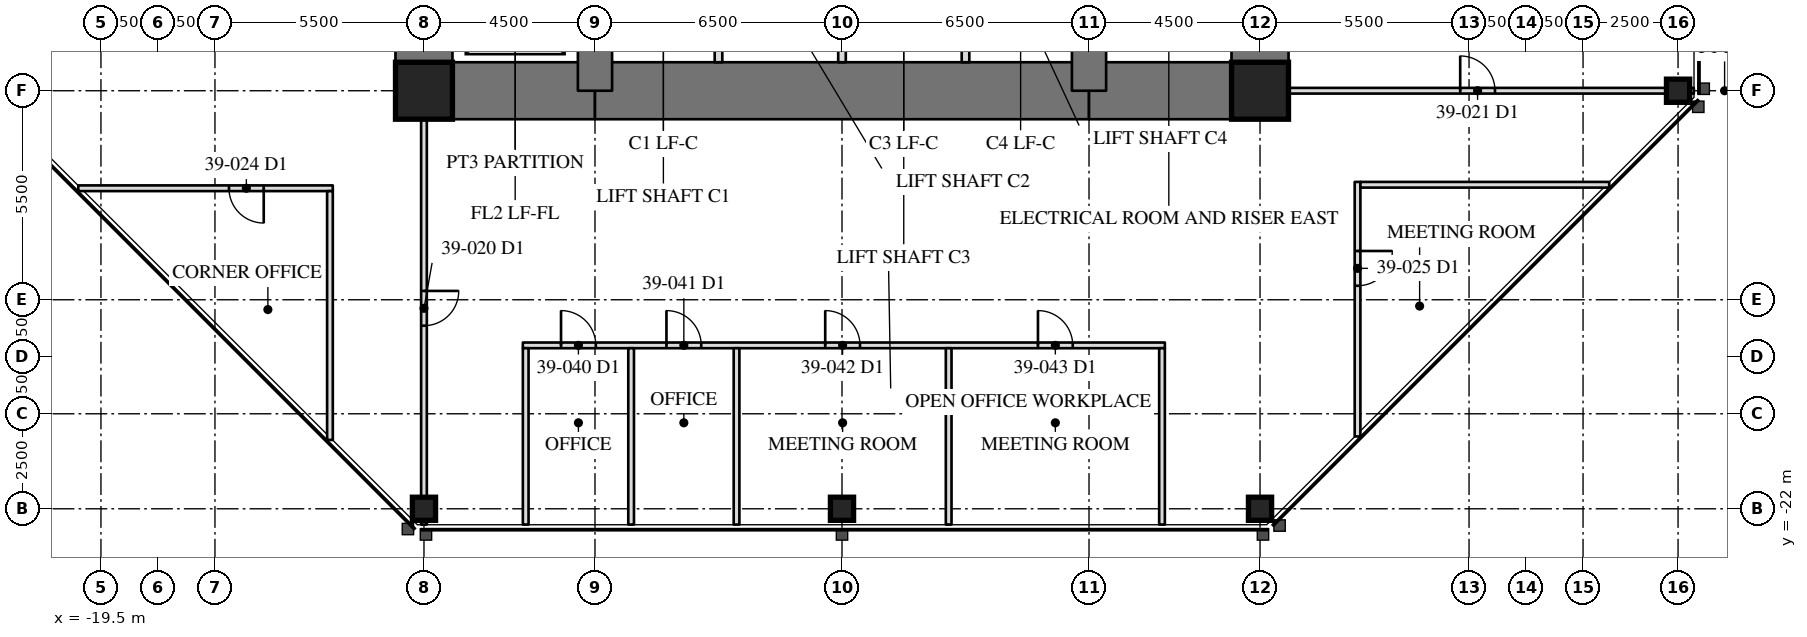
"""IFC4 building model, lengths in metres.
Left out: names, types, materials, properties, quantities, classifications, styles, units other than length and angle.
Written with IfcOpenShell. Run it as: python <this file> out.ifc"""

import sys

from ifc_helpers import new_model, si_unit, direction, frame, frame_2d, origin, origin_2d, place, context, subcontext, project, spatial, rectangle, hollow_rectangle, extrude, element, fill, save


model = new_model("IFC4")
c1 = context("Model", 3, precision=1e-05, world=origin(), true_north=direction((0.0, 1.0)))
c2 = subcontext(c1, "Body", "Model", "MODEL_VIEW")
j1 = project(units=[si_unit("LENGTHUNIT", "METRE"), si_unit("PLANEANGLEUNIT", "RADIAN")], contexts=[c1])
p1 = place(None, origin())
s1 = spatial("IfcSite", under=j1, at=p1, CompositionType="ELEMENT")
p2 = place(p1, origin())
s2 = spatial("IfcBuilding", under=s1, at=p2, CompositionType="ELEMENT")
p3 = place(p2, frame((0.0, 0.0, 166.4)))
s3 = spatial("IfcBuildingStorey", under=s2, at=p3, CompositionType="ELEMENT", Elevation=166.4)
for number, where, z_axis, x_axis in (
    (1, (-11.0, -22.0, 0.0), (0.0, 0.0, 1.0), (1.0, 0.0, 0.0)),
    (2, (0.0, -22.0, 0.0), (0.0, 0.0, 1.0), (1.0, 0.0, 0.0)),
    (3, (11.0, -22.0, 0.0), (0.0, 0.0, 1.0), (1.0, 0.0, 0.0)),
    (4, (22.0, -11.0, 0.0), (0.0, 0.0, 1.0), (0.0, 1.0, 0.0)),
):
    element("IfcColumn", number, at=place(p3, frame(where, z_axis=z_axis, x_axis=x_axis)), inside=s3, PredefinedType="COLUMN", context=c2, shape_type="SweptSolid", body=[
        extrude(hollow_rectangle(XDim=0.61, YDim=0.61, WallThickness=0.076, at=origin_2d()), origin(), (0.0, 0.0, 1.0), 4.1),
    ])
p4 = place(p3, frame((11.0, -11.0, 0.0), z_axis=(0.0, 0.0, 1.0), x_axis=(0.0, 1.0, 0.0)))
e5 = element("IfcWall", 5, at=p4, inside=s3, PredefinedType="SHEAR", context=c2, shape_type="SweptSolid", body=[
    extrude(rectangle(XDim=22.0, YDim=1.5, at=frame_2d((11.0, 0.0))), origin(), (0.0, 0.0, 1.0), 4.1),
])
p5 = place(p4, frame((15.393, 0.0, 0.0)))
e6 = element("IfcOpeningElement", 6, at=p5, cuts=e5, PredefinedType="OPENING", context=c2, shape_type="SweptSolid", body=[
    extrude(rectangle(XDim=0.915, YDim=2.134, at=frame_2d((0.458, 1.067))), frame((0.0, 0.76, 0.0), z_axis=(0.0, -1.0, 0.0), x_axis=(1.0, 0.0, 0.0)), (0.0, 0.0, 1.0), 1.52),
])
p6 = place(p3, frame((-11.0, 11.0, 0.0), z_axis=(0.0, 0.0, 1.0), x_axis=(0.0, -1.0, 0.0)))
e7 = element("IfcWall", 7, at=p6, inside=s3, PredefinedType="SHEAR", context=c2, shape_type="SweptSolid", body=[
    extrude(rectangle(XDim=22.0, YDim=1.5, at=frame_2d((11.0, 0.0))), origin(), (0.0, 0.0, 1.0), 4.1),
])
p7 = place(p6, frame((15.393, 0.0, 0.0)))
e8 = element("IfcOpeningElement", 8, at=p7, cuts=e7, PredefinedType="OPENING", context=c2, shape_type="SweptSolid", body=[
    extrude(rectangle(XDim=0.915, YDim=2.134, at=frame_2d((0.458, 1.067))), frame((0.0, 0.76, 0.0), z_axis=(0.0, -1.0, 0.0), x_axis=(1.0, 0.0, 0.0)), (0.0, 0.0, 1.0), 1.52),
])
p8 = place(p3, frame((-11.0, -11.0, 0.0), z_axis=(0.0, 0.0, 1.0), x_axis=(1.0, 0.0, 0.0)))
e9 = element("IfcWall", 9, at=p8, inside=s3, PredefinedType="SHEAR", context=c2, shape_type="SweptSolid", body=[
    extrude(rectangle(XDim=4.5, YDim=1.5, at=frame_2d((2.25, 0.0))), origin(), (0.0, 0.0, 1.0), 4.1),
])
p9 = place(p3, frame((-6.5, -11.0, 0.0), z_axis=(0.0, 0.0, 1.0), x_axis=(1.0, 0.0, 0.0)))
e10 = element("IfcWall", 10, at=p9, inside=s3, PredefinedType="SHEAR", context=c2, shape_type="SweptSolid", body=[
    extrude(rectangle(XDim=13.0, YDim=1.5, at=frame_2d((6.5, 0.0))), origin(), (0.0, 0.0, 1.0), 4.1),
])
p10 = place(p3, frame((6.5, -11.0, 0.0), z_axis=(0.0, 0.0, 1.0), x_axis=(1.0, 0.0, 0.0)))
e11 = element("IfcWall", 11, at=p10, inside=s3, PredefinedType="SHEAR", context=c2, shape_type="SweptSolid", body=[
    extrude(rectangle(XDim=4.5, YDim=1.5, at=frame_2d((2.25, 0.0))), origin(), (0.0, 0.0, 1.0), 4.1),
])
for number, where, z_axis, x_axis in (
    (12, (6.5, -11.0, 0.0), (0.0, 0.0, 1.0), (0.0, 1.0, 0.0)),
    (13, (-6.5, -6.5, 0.0), (0.0, 0.0, 1.0), (0.0, -1.0, 0.0)),
):
    element("IfcWall", number, at=place(p3, frame(where, z_axis=z_axis, x_axis=x_axis)), inside=s3, PredefinedType="SHEAR", context=c2, shape_type="SweptSolid", body=[
        extrude(rectangle(XDim=4.5, YDim=0.9, at=frame_2d((2.25, 0.0))), origin(), (0.0, 0.0, 1.0), 4.1),
    ])
for number, where, z_axis, x_axis in (
    (14, (-11.0, -11.0, 0.0), (0.0, 0.0, 1.0), (1.0, 0.0, 0.0)),
    (15, (11.0, -11.0, 0.0), (0.0, 0.0, 1.0), (1.0, 0.0, 0.0)),
):
    element("IfcColumn", number, at=place(p3, frame(where, z_axis=z_axis, x_axis=x_axis)), inside=s3, PredefinedType="COLUMN", context=c2, shape_type="SweptSolid", body=[
        extrude(hollow_rectangle(XDim=1.499, YDim=1.499, WallThickness=0.102, at=origin_2d()), origin(), (0.0, 0.0, 1.0), 4.1),
    ])
for number, where, z_axis, x_axis in (
    (16, (-3.25, -10.25, 0.0), (0.0, 0.0, 1.0), (0.0, 1.0, 0.0)),
    (17, (0.0, -10.25, 0.0), (0.0, 0.0, 1.0), (0.0, 1.0, 0.0)),
    (18, (3.25, -10.25, 0.0), (0.0, 0.0, 1.0), (0.0, 1.0, 0.0)),
):
    element("IfcWall", number, at=place(p3, frame(where, z_axis=z_axis, x_axis=x_axis)), inside=s3, PredefinedType="PARTITIONING", context=c2, shape_type="SweptSolid", body=[
        extrude(rectangle(XDim=3.3, YDim=0.2, at=frame_2d((1.65, 0.0))), origin(), (0.0, 0.0, 1.0), 3.91),
    ])
p11 = place(p3, frame((-11.0, -11.75, 0.0), z_axis=(0.0, 0.0, 1.0), x_axis=(0.0, -1.0, 0.0)))
e19 = element("IfcWall", 19, at=p11, inside=s3, PredefinedType="PARTITIONING", context=c2, shape_type="SweptSolid", body=[
    extrude(rectangle(XDim=10.665, YDim=0.15, at=frame_2d((5.333, 0.0))), origin(), (0.0, 0.0, 1.0), 3.326),
])
p12 = place(p11, frame((4.518, 0.0, 0.0)))
e20 = element("IfcOpeningElement", 20, at=p12, cuts=e19, PredefinedType="OPENING", context=c2, shape_type="SweptSolid", body=[
    extrude(rectangle(XDim=0.915, YDim=2.134, at=frame_2d((0.458, 1.067))), frame((0.0, 0.085, 0.0), z_axis=(0.0, -1.0, 0.0), x_axis=(1.0, 0.0, 0.0)), (0.0, 0.0, 1.0), 0.17),
])
p13 = place(p3, frame((11.75, -11.0, 0.0), z_axis=(0.0, 0.0, 1.0), x_axis=(1.0, 0.0, 0.0)))
e21 = element("IfcWall", 21, at=p13, inside=s3, PredefinedType="PARTITIONING", context=c2, shape_type="SweptSolid", body=[
    extrude(rectangle(XDim=10.665, YDim=0.15, at=frame_2d((5.333, 0.0))), origin(), (0.0, 0.0, 1.0), 3.326),
])
p14 = place(p13, frame((4.518, 0.0, 0.0)))
e22 = element("IfcOpeningElement", 22, at=p14, cuts=e21, PredefinedType="OPENING", context=c2, shape_type="SweptSolid", body=[
    extrude(rectangle(XDim=0.915, YDim=2.134, at=frame_2d((0.458, 1.067))), frame((0.0, 0.085, 0.0), z_axis=(0.0, -1.0, 0.0), x_axis=(1.0, 0.0, 0.0)), (0.0, 0.0, 1.0), 0.17),
])
p15 = place(p3, frame((-13.399, -13.566, 0.0), z_axis=(0.0, 0.0, 1.0), x_axis=(-1.0, 0.0, 0.0)))
e23 = element("IfcWall", 23, at=p15, inside=s3, PredefinedType="PARTITIONING", context=c2, shape_type="SweptSolid", body=[
    extrude(rectangle(XDim=6.698, YDim=0.15, at=frame_2d((3.349, 0.0))), origin(), (0.0, 0.0, 1.0), 3.91),
])
p16 = place(p15, frame((1.817, 0.0, 0.0)))
e24 = element("IfcOpeningElement", 24, at=p16, cuts=e23, PredefinedType="OPENING", context=c2, shape_type="SweptSolid", body=[
    extrude(rectangle(XDim=0.915, YDim=2.134, at=frame_2d((0.458, 1.067))), frame((0.0, 0.085, 0.0), z_axis=(0.0, -1.0, 0.0), x_axis=(1.0, 0.0, 0.0)), (0.0, 0.0, 1.0), 0.17),
])
p17 = place(p3, frame((-13.474, -13.641, 0.0), z_axis=(0.0, 0.0, 1.0), x_axis=(0.0, -1.0, 0.0)))
e25 = element("IfcWall", 25, at=p17, inside=s3, PredefinedType="PARTITIONING", context=c2, shape_type="SweptSolid", body=[
    extrude(rectangle(XDim=6.548, YDim=0.15, at=frame_2d((3.274, 0.0))), origin(), (0.0, 0.0, 1.0), 3.91),
])
p18 = place(p3, frame((13.566, -13.399, 0.0), z_axis=(0.0, 0.0, 1.0), x_axis=(0.0, -1.0, 0.0)))
e26 = element("IfcWall", 26, at=p18, inside=s3, PredefinedType="PARTITIONING", context=c2, shape_type="SweptSolid", body=[
    extrude(rectangle(XDim=6.698, YDim=0.15, at=frame_2d((3.349, 0.0))), origin(), (0.0, 0.0, 1.0), 3.91),
])
p19 = place(p18, frame((1.817, 0.0, 0.0)))
e27 = element("IfcOpeningElement", 27, at=p19, cuts=e26, PredefinedType="OPENING", context=c2, shape_type="SweptSolid", body=[
    extrude(rectangle(XDim=0.915, YDim=2.134, at=frame_2d((0.458, 1.067))), frame((0.0, 0.085, 0.0), z_axis=(0.0, -1.0, 0.0), x_axis=(1.0, 0.0, 0.0)), (0.0, 0.0, 1.0), 0.17),
])
p20 = place(p3, frame((13.641, -13.474, 0.0), z_axis=(0.0, 0.0, 1.0), x_axis=(1.0, 0.0, 0.0)))
e28 = element("IfcWall", 28, at=p20, inside=s3, PredefinedType="PARTITIONING", context=c2, shape_type="SweptSolid", body=[
    extrude(rectangle(XDim=6.548, YDim=0.15, at=frame_2d((3.274, 0.0))), origin(), (0.0, 0.0, 1.0), 3.91),
])
p21 = place(p3, frame((-8.398, -17.7, 0.0), z_axis=(0.0, 0.0, 1.0), x_axis=(1.0, 0.0, 0.0)))
e29 = element("IfcWall", 29, at=p21, inside=s3, PredefinedType="PARTITIONING", context=c2, shape_type="SweptSolid", body=[
    extrude(rectangle(XDim=16.894, YDim=0.15, at=frame_2d((8.447, 0.0))), origin(), (0.0, 0.0, 1.0), 3.91),
])
p22 = place(p21, frame((1.004, 0.0, 0.0)))
e30 = element("IfcOpeningElement", 30, at=p22, cuts=e29, PredefinedType="OPENING", context=c2, shape_type="SweptSolid", body=[
    extrude(rectangle(XDim=0.915, YDim=2.134, at=frame_2d((0.458, 1.067))), frame((0.0, 0.085, 0.0), z_axis=(0.0, -1.0, 0.0), x_axis=(1.0, 0.0, 0.0)), (0.0, 0.0, 1.0), 0.17),
])
p23 = place(p21, frame((3.779, 0.0, 0.0)))
e31 = element("IfcOpeningElement", 31, at=p23, cuts=e29, PredefinedType="OPENING", context=c2, shape_type="SweptSolid", body=[
    extrude(rectangle(XDim=0.915, YDim=2.134, at=frame_2d((0.458, 1.067))), frame((0.0, 0.085, 0.0), z_axis=(0.0, -1.0, 0.0), x_axis=(1.0, 0.0, 0.0)), (0.0, 0.0, 1.0), 0.17),
])
p24 = place(p21, frame((7.957, 0.0, 0.0)))
e32 = element("IfcOpeningElement", 32, at=p24, cuts=e29, PredefinedType="OPENING", context=c2, shape_type="SweptSolid", body=[
    extrude(rectangle(XDim=0.915, YDim=2.134, at=frame_2d((0.458, 1.067))), frame((0.0, 0.085, 0.0), z_axis=(0.0, -1.0, 0.0), x_axis=(1.0, 0.0, 0.0)), (0.0, 0.0, 1.0), 0.17),
])
p25 = place(p21, frame((13.554, 0.0, 0.0)))
e33 = element("IfcOpeningElement", 33, at=p25, cuts=e29, PredefinedType="OPENING", context=c2, shape_type="SweptSolid", body=[
    extrude(rectangle(XDim=0.915, YDim=2.134, at=frame_2d((0.458, 1.067))), frame((0.0, 0.085, 0.0), z_axis=(0.0, -1.0, 0.0), x_axis=(1.0, 0.0, 0.0)), (0.0, 0.0, 1.0), 0.17),
])
for number, where, z_axis, x_axis in (
    (34, (-8.323, -17.775, 0.0), (0.0, 0.0, 1.0), (0.0, -1.0, 0.0)),
    (35, (-5.549, -17.775, 0.0), (0.0, 0.0, 1.0), (0.0, -1.0, 0.0)),
    (36, (-2.775, -17.775, 0.0), (0.0, 0.0, 1.0), (0.0, -1.0, 0.0)),
    (37, (2.807, -17.775, 0.0), (0.0, 0.0, 1.0), (0.0, -1.0, 0.0)),
    (38, (8.421, -17.775, 0.0), (0.0, 0.0, 1.0), (0.0, -1.0, 0.0)),
):
    element("IfcWall", number, at=place(p3, frame(where, z_axis=z_axis, x_axis=x_axis)), inside=s3, PredefinedType="PARTITIONING", context=c2, shape_type="SweptSolid", body=[
        extrude(rectangle(XDim=4.64, YDim=0.15, at=frame_2d((2.32, 0.0))), origin(), (0.0, 0.0, 1.0), 3.91),
    ])
p26 = place(p12, origin())
e39 = element("IfcDoor", 39, at=p26, inside=s3, OperationType="SINGLE_SWING_LEFT", PredefinedType="DOOR", context=c2, shape_type="SweptSolid", body=[
    extrude(rectangle(XDim=0.915, YDim=2.134, at=frame_2d((0.458, 1.067))), frame((0.0, 0.025, 0.0), z_axis=(0.0, -1.0, 0.0), x_axis=(1.0, 0.0, 0.0)), (0.0, 0.0, 1.0), 0.05),
])
fill(e20, e39)
p27 = place(p14, origin())
e40 = element("IfcDoor", 40, at=p27, inside=s3, OperationType="SINGLE_SWING_LEFT", PredefinedType="DOOR", context=c2, shape_type="SweptSolid", body=[
    extrude(rectangle(XDim=0.915, YDim=2.134, at=frame_2d((0.458, 1.067))), frame((0.0, 0.025, 0.0), z_axis=(0.0, -1.0, 0.0), x_axis=(1.0, 0.0, 0.0)), (0.0, 0.0, 1.0), 0.05),
])
fill(e22, e40)
p28 = place(p16, origin())
e41 = element("IfcDoor", 41, at=p28, inside=s3, OperationType="SINGLE_SWING_LEFT", PredefinedType="DOOR", context=c2, shape_type="SweptSolid", body=[
    extrude(rectangle(XDim=0.915, YDim=2.134, at=frame_2d((0.458, 1.067))), frame((0.0, 0.025, 0.0), z_axis=(0.0, -1.0, 0.0), x_axis=(1.0, 0.0, 0.0)), (0.0, 0.0, 1.0), 0.05),
])
fill(e24, e41)
p29 = place(p19, origin())
e42 = element("IfcDoor", 42, at=p29, inside=s3, OperationType="SINGLE_SWING_LEFT", PredefinedType="DOOR", context=c2, shape_type="SweptSolid", body=[
    extrude(rectangle(XDim=0.915, YDim=2.134, at=frame_2d((0.458, 1.067))), frame((0.0, 0.025, 0.0), z_axis=(0.0, -1.0, 0.0), x_axis=(1.0, 0.0, 0.0)), (0.0, 0.0, 1.0), 0.05),
])
fill(e27, e42)
p30 = place(p22, origin())
e43 = element("IfcDoor", 43, at=p30, inside=s3, OperationType="SINGLE_SWING_LEFT", PredefinedType="DOOR", context=c2, shape_type="SweptSolid", body=[
    extrude(rectangle(XDim=0.915, YDim=2.134, at=frame_2d((0.458, 1.067))), frame((0.0, 0.025, 0.0), z_axis=(0.0, -1.0, 0.0), x_axis=(1.0, 0.0, 0.0)), (0.0, 0.0, 1.0), 0.05),
])
fill(e30, e43)
p31 = place(p23, origin())
e44 = element("IfcDoor", 44, at=p31, inside=s3, OperationType="SINGLE_SWING_LEFT", PredefinedType="DOOR", context=c2, shape_type="SweptSolid", body=[
    extrude(rectangle(XDim=0.915, YDim=2.134, at=frame_2d((0.458, 1.067))), frame((0.0, 0.025, 0.0), z_axis=(0.0, -1.0, 0.0), x_axis=(1.0, 0.0, 0.0)), (0.0, 0.0, 1.0), 0.05),
])
fill(e31, e44)
p32 = place(p24, origin())
e45 = element("IfcDoor", 45, at=p32, inside=s3, OperationType="SINGLE_SWING_LEFT", PredefinedType="DOOR", context=c2, shape_type="SweptSolid", body=[
    extrude(rectangle(XDim=0.915, YDim=2.134, at=frame_2d((0.458, 1.067))), frame((0.0, 0.025, 0.0), z_axis=(0.0, -1.0, 0.0), x_axis=(1.0, 0.0, 0.0)), (0.0, 0.0, 1.0), 0.05),
])
fill(e32, e45)
p33 = place(p25, origin())
e46 = element("IfcDoor", 46, at=p33, inside=s3, OperationType="SINGLE_SWING_LEFT", PredefinedType="DOOR", context=c2, shape_type="SweptSolid", body=[
    extrude(rectangle(XDim=0.915, YDim=2.134, at=frame_2d((0.458, 1.067))), frame((0.0, 0.025, 0.0), z_axis=(0.0, -1.0, 0.0), x_axis=(1.0, 0.0, 0.0)), (0.0, 0.0, 1.0), 0.05),
])
fill(e33, e46)
save(model, sys.argv[1])
